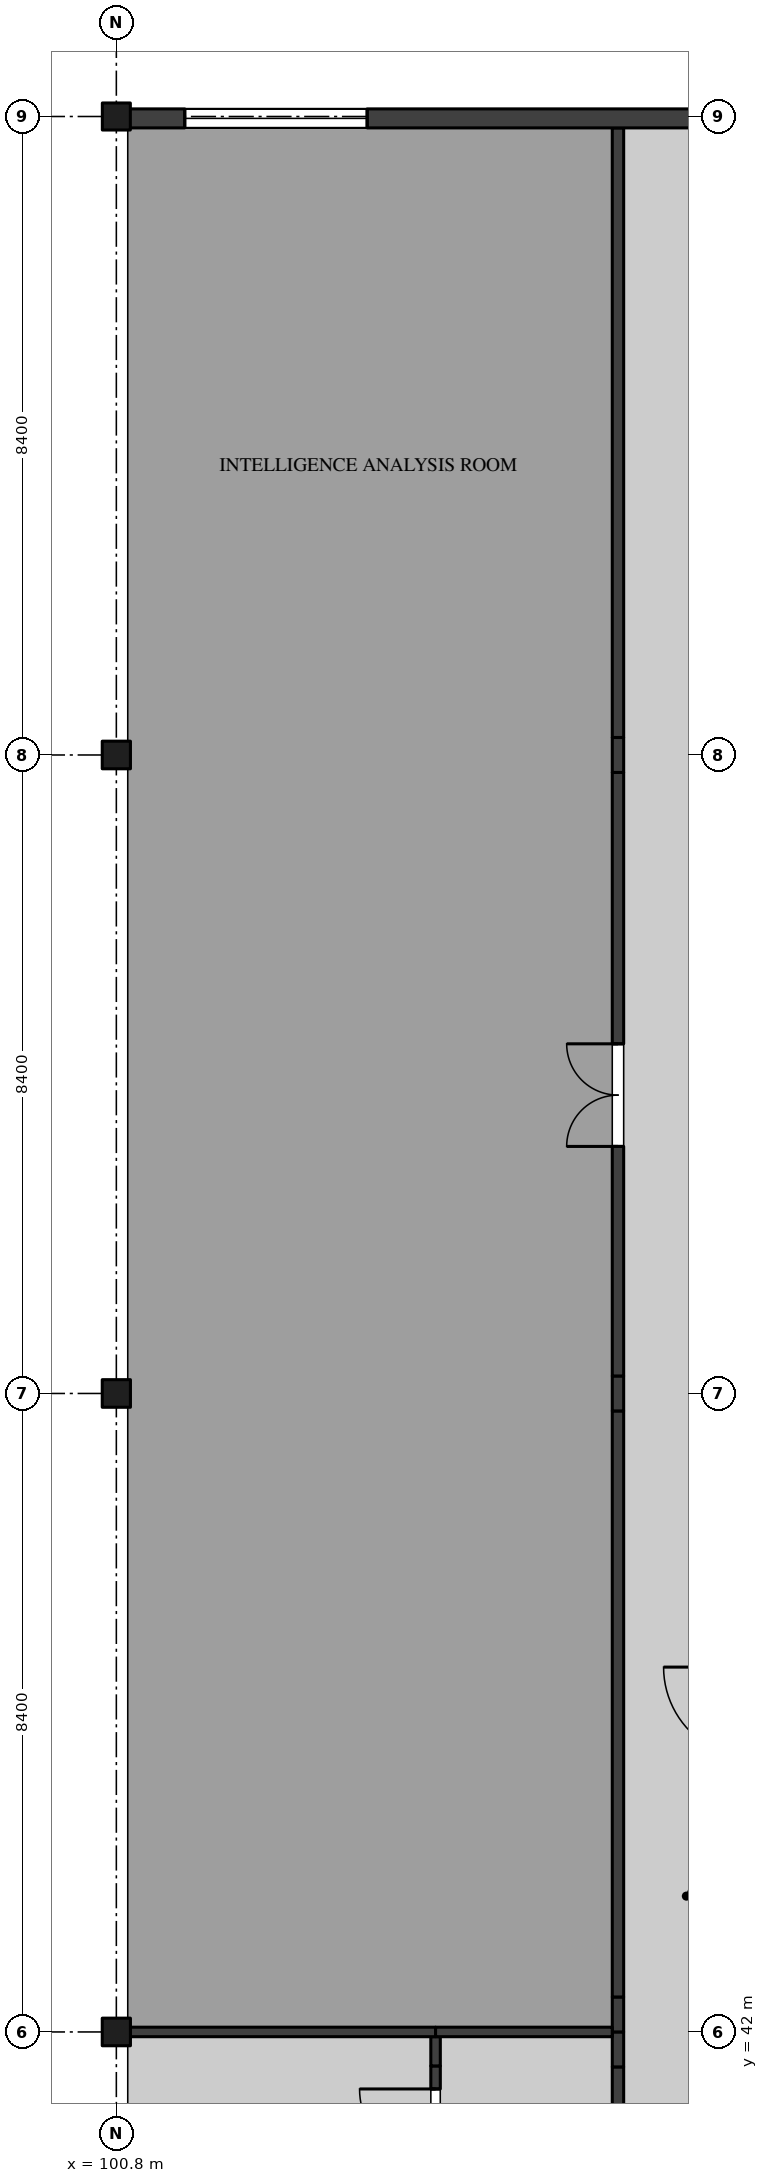
"""IFC4 building model, lengths in metres.
Left out: names, types, materials, properties, quantities, classifications, styles, units other than length and angle.
Written with IfcOpenShell. Run it as: python <this file> out.ifc"""

import sys

from ifc_helpers import new_model, si_unit, direction, frame, frame_2d, origin, origin_2d, place, context, subcontext, project, spatial, rectangle, i_section, extrude, element, fill, save


model = new_model("IFC4")
c1 = context("Model", 3, precision=1e-05, world=origin(), true_north=direction((0.0, 1.0)))
c2 = subcontext(c1, "Body", "Model", "MODEL_VIEW")
j1 = project(units=[si_unit("LENGTHUNIT", "METRE"), si_unit("PLANEANGLEUNIT", "RADIAN")], contexts=[c1])
p1 = place(None, origin())
s1 = spatial("IfcSite", under=j1, at=p1, CompositionType="ELEMENT")
p2 = place(p1, origin())
s2 = spatial("IfcBuilding", under=s1, at=p2, CompositionType="ELEMENT")
p3 = place(p2, frame((0.0, 0.0, 27.9)))
s3 = spatial("IfcBuildingStorey", under=s2, at=p3, CompositionType="ELEMENT", Elevation=27.9)
for number, where, z_axis, x_axis in (
    (1, (100.8, 42.0, 0.0), (0.0, 0.0, 1.0), (1.0, 0.0, 0.0)),
    (2, (100.8, 50.4, 0.0), (0.0, 0.0, 1.0), (1.0, 0.0, 0.0)),
    (3, (100.8, 58.8, 0.0), (0.0, 0.0, 1.0), (1.0, 0.0, 0.0)),
):
    element("IfcColumn", number, at=place(p3, frame(where, z_axis=z_axis, x_axis=x_axis)), inside=s3, PredefinedType="COLUMN", context=c2, shape_type="SweptSolid", body=[
        extrude(i_section(OverallWidth=0.371, OverallDepth=0.363, WebThickness=0.013, FlangeThickness=0.022, FilletRadius=0.015, at=origin_2d()), origin(), (0.0, 0.0, 1.0), 4.37),
    ])
p4 = place(p3, frame((100.8, 67.2, 0.0), z_axis=(0.0, 0.0, 1.0), x_axis=(1.0, 0.0, 0.0)))
e4 = element("IfcColumn", 4, at=p4, inside=s3, PredefinedType="COLUMN", context=c2, shape_type="SweptSolid", body=[
    extrude(i_section(OverallWidth=0.368, OverallDepth=0.356, WebThickness=0.011, FlangeThickness=0.018, FilletRadius=0.015, at=origin_2d()), origin(), (0.0, 0.0, 1.0), 4.37),
])
p5 = place(p3, frame((107.4, 33.75, 0.0), z_axis=(0.0, 0.0, 1.0), x_axis=(0.0, 1.0, 0.0)))
e5 = element("IfcWall", 5, at=p5, inside=s3, PredefinedType="PARTITIONING", context=c2, shape_type="SweptSolid", body=[
    extrude(rectangle(XDim=7.79, YDim=0.15, at=frame_2d((3.895, 0.0))), origin(), (0.0, 0.0, 1.0), 4.37),
])
p6 = place(p5, frame((2.4, 0.0, 0.0)))
e6 = element("IfcOpeningElement", 6, at=p6, cuts=e5, PredefinedType="OPENING", context=c2, shape_type="SweptSolid", body=[
    extrude(rectangle(XDim=0.9, YDim=2.1, at=frame_2d((0.45, 1.05))), frame((0.0, 0.085, 0.0), z_axis=(0.0, -1.0, 0.0), x_axis=(1.0, 0.0, 0.0)), (0.0, 0.0, 1.0), 0.17),
])
for number, where, z_axis, x_axis in (
    (7, (107.4, 41.54, 0.0), (0.0, 0.0, 1.0), (0.0, 1.0, 0.0)),
    (8, (107.4, 42.0, 0.0), (0.0, 0.0, 1.0), (0.0, 1.0, 0.0)),
):
    element("IfcWall", number, at=place(p3, frame(where, z_axis=z_axis, x_axis=x_axis)), inside=s3, PredefinedType="PARTITIONING", context=c2, shape_type="SweptSolid", body=[
        extrude(rectangle(XDim=0.46, YDim=0.15, at=frame_2d((0.23, 0.0))), origin(), (0.0, 0.0, 1.0), 3.746),
    ])
p7 = place(p3, frame((107.4, 42.46, 0.0), z_axis=(0.0, 0.0, 1.0), x_axis=(0.0, 1.0, 0.0)))
e9 = element("IfcWall", 9, at=p7, inside=s3, PredefinedType="PARTITIONING", context=c2, shape_type="SweptSolid", body=[
    extrude(rectangle(XDim=7.71, YDim=0.15, at=frame_2d((3.855, 0.0))), origin(), (0.0, 0.0, 1.0), 4.37),
])
p8 = place(p3, frame((107.4, 50.17, 0.0), z_axis=(0.0, 0.0, 1.0), x_axis=(0.0, 1.0, 0.0)))
e10 = element("IfcWall", 10, at=p8, inside=s3, PredefinedType="PARTITIONING", context=c2, shape_type="SweptSolid", body=[
    extrude(rectangle(XDim=0.46, YDim=0.15, at=frame_2d((0.23, 0.0))), origin(), (0.0, 0.0, 1.0), 3.746),
])
p9 = place(p3, frame((107.4, 50.63, 0.0), z_axis=(0.0, 0.0, 1.0), x_axis=(0.0, 1.0, 0.0)))
e11 = element("IfcWall", 11, at=p9, inside=s3, PredefinedType="PARTITIONING", context=c2, shape_type="SweptSolid", body=[
    extrude(rectangle(XDim=7.94, YDim=0.15, at=frame_2d((3.97, 0.0))), origin(), (0.0, 0.0, 1.0), 4.37),
])
p10 = place(p9, frame((3.02, 0.0, 0.0)))
e12 = element("IfcOpeningElement", 12, at=p10, cuts=e11, PredefinedType="OPENING", context=c2, shape_type="SweptSolid", body=[
    extrude(rectangle(XDim=1.35, YDim=2.1, at=frame_2d((0.675, 1.05))), frame((0.0, 0.085, 0.0), z_axis=(0.0, -1.0, 0.0), x_axis=(1.0, 0.0, 0.0)), (0.0, 0.0, 1.0), 0.17),
])
p11 = place(p3, frame((107.4, 58.57, 0.0), z_axis=(0.0, 0.0, 1.0), x_axis=(0.0, 1.0, 0.0)))
e13 = element("IfcWall", 13, at=p11, inside=s3, PredefinedType="PARTITIONING", context=c2, shape_type="SweptSolid", body=[
    extrude(rectangle(XDim=0.46, YDim=0.15, at=frame_2d((0.23, 0.0))), origin(), (0.0, 0.0, 1.0), 3.746),
])
p12 = place(p3, frame((107.4, 59.03, 0.0), z_axis=(0.0, 0.0, 1.0), x_axis=(0.0, 1.0, 0.0)))
e14 = element("IfcWall", 14, at=p12, inside=s3, PredefinedType="PARTITIONING", context=c2, shape_type="SweptSolid", body=[
    extrude(rectangle(XDim=8.02, YDim=0.15, at=frame_2d((4.01, 0.0))), origin(), (0.0, 0.0, 1.0), 4.37),
])
p13 = place(p3, frame((105.0, 39.6, 0.0), z_axis=(0.0, 0.0, 1.0), x_axis=(0.0, 1.0, 0.0)))
e15 = element("IfcWall", 15, at=p13, inside=s3, PredefinedType="PARTITIONING", context=c2, shape_type="SweptSolid", body=[
    extrude(rectangle(XDim=1.953, YDim=0.125, at=frame_2d((0.977, 0.0))), origin(), (0.0, 0.0, 1.0), 4.37),
])
p14 = place(p13, frame((0.65, 0.0, 0.0)))
e16 = element("IfcOpeningElement", 16, at=p14, cuts=e15, PredefinedType="OPENING", context=c2, shape_type="SweptSolid", body=[
    extrude(rectangle(XDim=1.0, YDim=2.1, at=frame_2d((0.5, 1.05))), frame((0.0, 0.073, 0.0), z_axis=(0.0, -1.0, 0.0), x_axis=(1.0, 0.0, 0.0)), (0.0, 0.0, 1.0), 0.145),
])
p15 = place(p3, frame((105.0, 41.553, 0.0), z_axis=(0.0, 0.0, 1.0), x_axis=(0.0, 1.0, 0.0)))
e17 = element("IfcWall", 17, at=p15, inside=s3, PredefinedType="PARTITIONING", context=c2, shape_type="SweptSolid", body=[
    extrude(rectangle(XDim=0.385, YDim=0.125, at=frame_2d((0.192, 0.0))), origin(), (0.0, 0.0, 1.0), 3.746),
])
p16 = place(p3, frame((100.986, 42.0, 0.0), z_axis=(0.0, 0.0, 1.0), x_axis=(1.0, 0.0, 0.0)))
e18 = element("IfcWall", 18, at=p16, inside=s3, PredefinedType="PARTITIONING", context=c2, shape_type="SweptSolid", body=[
    extrude(rectangle(XDim=4.014, YDim=0.125, at=frame_2d((2.007, 0.0))), origin(), (0.0, 0.0, 1.0), 3.746),
])
p17 = place(p3, frame((105.0, 42.0, 0.0), z_axis=(0.0, 0.0, 1.0), x_axis=(1.0, 0.0, 0.0)))
e19 = element("IfcWall", 19, at=p17, inside=s3, PredefinedType="PARTITIONING", context=c2, shape_type="SweptSolid", body=[
    extrude(rectangle(XDim=2.325, YDim=0.125, at=frame_2d((1.163, 0.0))), origin(), (0.0, 0.0, 1.0), 3.746),
])
p18 = place(p3, frame((109.0, 67.175, 0.0), z_axis=(0.0, 0.0, 1.0), x_axis=(-1.0, 0.0, 0.0)))
e20 = element("IfcWall", 20, at=p18, inside=s3, PredefinedType="SOLIDWALL", context=c2, shape_type="SweptSolid", body=[
    extrude(rectangle(XDim=8.196, YDim=0.25, at=frame_2d((4.098, 0.0))), origin(), (0.0, 0.0, 1.0), 3.746),
])
p19 = place(p18, frame((4.9, 0.0, 0.9)))
e21 = element("IfcOpeningElement", 21, at=p19, cuts=e20, PredefinedType="OPENING", context=c2, shape_type="SweptSolid", body=[
    extrude(rectangle(XDim=2.4, YDim=2.25, at=frame_2d((1.2, 1.125))), frame((0.0, 0.135, 0.0), z_axis=(0.0, -1.0, 0.0), x_axis=(1.0, 0.0, 0.0)), (0.0, 0.0, 1.0), 0.27),
])
p20 = place(p14, origin())
e22 = element("IfcDoor", 22, at=p20, inside=s3, OperationType="SINGLE_SWING_LEFT", PredefinedType="DOOR", context=c2, shape_type="SweptSolid", body=[
    extrude(rectangle(XDim=1.0, YDim=2.1, at=frame_2d((0.5, 1.05))), frame((0.0, 0.02, 0.0), z_axis=(0.0, -1.0, 0.0), x_axis=(1.0, 0.0, 0.0)), (0.0, 0.0, 1.0), 0.04),
])
fill(e16, e22)
p21 = place(p10, origin())
e23 = element("IfcDoor", 23, at=p21, inside=s3, OperationType="DOUBLE_DOOR_SINGLE_SWING", PredefinedType="DOOR", context=c2, shape_type="SweptSolid", body=[
    extrude(rectangle(XDim=1.35, YDim=2.1, at=frame_2d((0.675, 1.05))), frame((0.0, 0.025, 0.0), z_axis=(0.0, -1.0, 0.0), x_axis=(1.0, 0.0, 0.0)), (0.0, 0.0, 1.0), 0.05),
])
fill(e12, e23)
p22 = place(p19, origin())
e24 = element("IfcWindow", 24, at=p22, inside=s3, PartitioningType="SINGLE_PANEL", PredefinedType="WINDOW", context=c2, shape_type="SweptSolid", body=[
    extrude(rectangle(XDim=2.4, YDim=2.25, at=frame_2d((1.2, 1.125))), frame((0.0, 0.03, 0.0), z_axis=(0.0, -1.0, 0.0), x_axis=(1.0, 0.0, 0.0)), (0.0, 0.0, 1.0), 0.06),
])
fill(e21, e24)
save(model, sys.argv[1])
